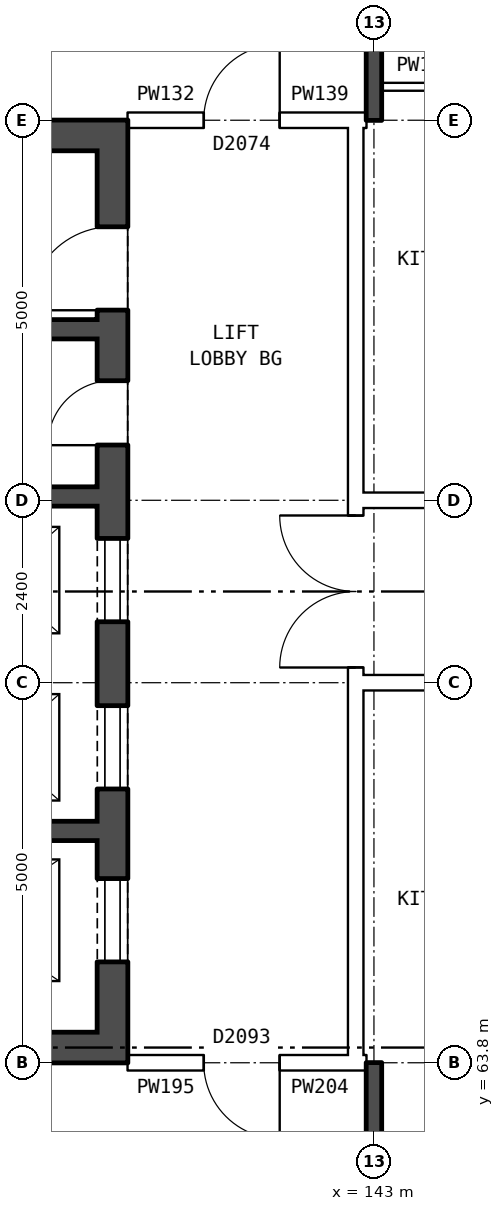
"""IFC4 building model, lengths in metres.
Left out: names, types, materials, properties, quantities, classifications, styles, units other than length and angle.
Written with IfcOpenShell. Run it as: python <this file> out.ifc"""

import sys

from ifc_helpers import new_model, si_unit, direction, frame, frame_2d, origin, place, context, subcontext, project, spatial, rectangle, extrude, element, fill, save


model = new_model("IFC4")
c1 = context("Model", 3, precision=1e-05, world=origin(), true_north=direction((0.0, 1.0)))
c2 = subcontext(c1, "Body", "Model", "MODEL_VIEW")
j1 = project(units=[si_unit("LENGTHUNIT", "METRE"), si_unit("PLANEANGLEUNIT", "RADIAN")], contexts=[c1])
p1 = place(None, origin())
s1 = spatial("IfcSite", under=j1, at=p1, CompositionType="ELEMENT")
p2 = place(p1, origin())
s2 = spatial("IfcBuilding", under=s1, at=p2, CompositionType="ELEMENT")
p3 = place(p2, frame((0.0, 0.0, 202.8)))
s3 = spatial("IfcBuildingStorey", under=s2, at=p3, CompositionType="ELEMENT", Elevation=202.8)
p4 = place(p3, frame((139.56, 63.8, 0.0), z_axis=(0.0, 0.0, 1.0), x_axis=(0.0, 1.0, 0.0)))
e1 = element("IfcWall", 1, at=p4, inside=s3, PredefinedType="SHEAR", context=c2, shape_type="SweptSolid", body=[
    extrude(rectangle(XDim=12.4, YDim=0.4, at=frame_2d((6.2, 0.0))), origin(), (0.0, 0.0, 1.0), 2.85),
])
p5 = place(p4, frame((1.325, 0.0, 0.0)))
e2 = element("IfcOpeningElement", 2, at=p5, cuts=e1, PredefinedType="OPENING", context=c2, shape_type="SweptSolid", body=[
    extrude(rectangle(XDim=1.1, YDim=2.1, at=frame_2d((0.55, 1.05))), frame((0.0, 0.21, 0.0), z_axis=(0.0, -1.0, 0.0), x_axis=(1.0, 0.0, 0.0)), (0.0, 0.0, 1.0), 0.42),
])
p6 = place(p4, frame((3.6, 0.0, 0.0)))
e3 = element("IfcOpeningElement", 3, at=p6, cuts=e1, PredefinedType="OPENING", context=c2, shape_type="SweptSolid", body=[
    extrude(rectangle(XDim=1.1, YDim=2.1, at=frame_2d((0.55, 1.05))), frame((0.0, 0.21, 0.0), z_axis=(0.0, -1.0, 0.0), x_axis=(1.0, 0.0, 0.0)), (0.0, 0.0, 1.0), 0.42),
])
p7 = place(p4, frame((5.8, 0.0, 0.0)))
e4 = element("IfcOpeningElement", 4, at=p7, cuts=e1, PredefinedType="OPENING", context=c2, shape_type="SweptSolid", body=[
    extrude(rectangle(XDim=1.1, YDim=2.1, at=frame_2d((0.55, 1.05))), frame((0.0, 0.21, 0.0), z_axis=(0.0, -1.0, 0.0), x_axis=(1.0, 0.0, 0.0)), (0.0, 0.0, 1.0), 0.42),
])
p8 = place(p4, frame((9.9, 0.0, 0.0)))
e5 = element("IfcOpeningElement", 5, at=p8, cuts=e1, PredefinedType="OPENING", context=c2, shape_type="SweptSolid", body=[
    extrude(rectangle(XDim=1.1, YDim=2.1, at=frame_2d((0.55, 1.05))), frame((0.0, 0.21, 0.0), z_axis=(0.0, -1.0, 0.0), x_axis=(1.0, 0.0, 0.0)), (0.0, 0.0, 1.0), 0.42),
])
p9 = place(p4, frame((8.125, 0.0, 0.0)))
e6 = element("IfcOpeningElement", 6, at=p9, cuts=e1, PredefinedType="OPENING", context=c2, shape_type="SweptSolid", body=[
    extrude(rectangle(XDim=0.85, YDim=2.1, at=frame_2d((0.425, 1.05))), frame((0.0, 0.21, 0.0), z_axis=(0.0, -1.0, 0.0), x_axis=(1.0, 0.0, 0.0)), (0.0, 0.0, 1.0), 0.42),
])
for number, where, z_axis, x_axis in (
    (7, (139.36, 64.0, 0.0), (0.0, 0.0, 1.0), (-1.0, 0.0, 0.0)),
    (8, (139.36, 76.0, 0.0), (0.0, 0.0, 1.0), (-1.0, 0.0, 0.0)),
):
    element("IfcWall", number, at=place(p3, frame(where, z_axis=z_axis, x_axis=x_axis)), inside=s3, PredefinedType="SHEAR", context=c2, shape_type="SweptSolid", body=[
        extrude(rectangle(XDim=7.6, YDim=0.4, at=frame_2d((3.8, 0.0))), origin(), (0.0, 0.0, 1.0), 2.85),
    ])
p10 = place(p3, frame((139.36, 66.85, 0.0), z_axis=(0.0, 0.0, 1.0), x_axis=(-1.0, 0.0, 0.0)))
e9 = element("IfcWall", 9, at=p10, inside=s3, PredefinedType="SHEAR", context=c2, shape_type="SweptSolid", body=[
    extrude(rectangle(XDim=4.775, YDim=0.25, at=frame_2d((2.388, 0.0))), origin(), (0.0, 0.0, 1.0), 2.85),
])
p11 = place(p3, frame((139.36, 71.25, 0.0), z_axis=(0.0, 0.0, 1.0), x_axis=(-1.0, 0.0, 0.0)))
e10 = element("IfcWall", 10, at=p11, inside=s3, PredefinedType="SHEAR", context=c2, shape_type="SweptSolid", body=[
    extrude(rectangle(XDim=7.6, YDim=0.25, at=frame_2d((3.8, 0.0))), origin(), (0.0, 0.0, 1.0), 2.85),
])
p12 = place(p11, frame((5.175, 0.0, 0.0)))
e11 = element("IfcOpeningElement", 11, at=p12, cuts=e10, PredefinedType="OPENING", context=c2, shape_type="SweptSolid", body=[
    extrude(rectangle(XDim=1.1, YDim=2.1, at=frame_2d((0.55, 1.05))), frame((0.0, 0.135, 0.0), z_axis=(0.0, -1.0, 0.0), x_axis=(1.0, 0.0, 0.0)), (0.0, 0.0, 1.0), 0.27),
])
p13 = place(p11, frame((3.35, 0.0, 0.0)))
e12 = element("IfcOpeningElement", 12, at=p13, cuts=e10, PredefinedType="OPENING", context=c2, shape_type="SweptSolid", body=[
    extrude(rectangle(XDim=0.85, YDim=2.1, at=frame_2d((0.425, 1.05))), frame((0.0, 0.135, 0.0), z_axis=(0.0, -1.0, 0.0), x_axis=(1.0, 0.0, 0.0)), (0.0, 0.0, 1.0), 0.27),
])
p14 = place(p3, frame((139.36, 73.45, 0.0), z_axis=(0.0, 0.0, 1.0), x_axis=(-1.0, 0.0, 0.0)))
e13 = element("IfcWall", 13, at=p14, inside=s3, PredefinedType="SHEAR", context=c2, shape_type="SweptSolid", body=[
    extrude(rectangle(XDim=2.525, YDim=0.25, at=frame_2d((1.263, 0.0))), origin(), (0.0, 0.0, 1.0), 2.85),
])
p15 = place(p3, frame((142.76, 63.9, 0.0), z_axis=(0.0, 0.0, 1.0), x_axis=(0.0, 1.0, 0.0)))
e14 = element("IfcWall", 14, at=p15, inside=s3, PredefinedType="PARTITIONING", context=c2, shape_type="SweptSolid", body=[
    extrude(rectangle(XDim=12.2, YDim=0.2, at=frame_2d((6.1, 0.0))), origin(), (0.0, 0.0, 1.0), 2.85),
])
p16 = place(p15, frame((5.1, 0.0, 0.0)))
e15 = element("IfcOpeningElement", 15, at=p16, cuts=e14, PredefinedType="OPENING", context=c2, shape_type="SweptSolid", body=[
    extrude(rectangle(XDim=2.0, YDim=2.1, at=frame_2d((1.0, 1.05))), frame((0.0, 0.11, 0.0), z_axis=(0.0, -1.0, 0.0), x_axis=(1.0, 0.0, 0.0)), (0.0, 0.0, 1.0), 0.22),
])
p17 = place(p3, frame((139.76, 63.8, 0.0), z_axis=(0.0, 0.0, 1.0), x_axis=(1.0, 0.0, 0.0)))
e16 = element("IfcWall", 16, at=p17, inside=s3, PredefinedType="PARTITIONING", context=c2, shape_type="SweptSolid", body=[
    extrude(rectangle(XDim=3.0, YDim=0.2, at=frame_2d((1.5, 0.0))), origin(), (0.0, 0.0, 1.0), 2.85),
])
p18 = place(p17, frame((1.0, 0.0, 0.0)))
e17 = element("IfcOpeningElement", 17, at=p18, cuts=e16, PredefinedType="OPENING", context=c2, shape_type="SweptSolid", body=[
    extrude(rectangle(XDim=1.0, YDim=2.1, at=frame_2d((0.5, 1.05))), frame((0.0, 0.11, 0.0), z_axis=(0.0, -1.0, 0.0), x_axis=(1.0, 0.0, 0.0)), (0.0, 0.0, 1.0), 0.22),
])
p19 = place(p3, frame((142.76, 63.8, 0.0), z_axis=(0.0, 0.0, 1.0), x_axis=(1.0, 0.0, 0.0)))
e18 = element("IfcWall", 18, at=p19, inside=s3, PredefinedType="PARTITIONING", context=c2, shape_type="SweptSolid", body=[
    extrude(rectangle(XDim=0.14, YDim=0.2, at=frame_2d((0.07, 0.0))), origin(), (0.0, 0.0, 1.0), 2.85),
])
p20 = place(p3, frame((142.76, 68.8, 0.0), z_axis=(0.0, 0.0, 1.0), x_axis=(1.0, 0.0, 0.0)))
e19 = element("IfcWall", 19, at=p20, inside=s3, PredefinedType="PARTITIONING", context=c2, shape_type="SweptSolid", body=[
    extrude(rectangle(XDim=14.48, YDim=0.2, at=frame_2d((7.24, 0.0))), origin(), (0.0, 0.0, 1.0), 2.85),
])
p21 = place(p20, frame((1.12, 0.0, 0.0)))
e20 = element("IfcOpeningElement", 20, at=p21, cuts=e19, PredefinedType="OPENING", context=c2, shape_type="SweptSolid", body=[
    extrude(rectangle(XDim=1.0, YDim=2.1, at=frame_2d((0.5, 1.05))), frame((0.0, 0.11, 0.0), z_axis=(0.0, -1.0, 0.0), x_axis=(1.0, 0.0, 0.0)), (0.0, 0.0, 1.0), 0.22),
])
p22 = place(p20, frame((10.24, 0.0, 0.0)))
e21 = element("IfcOpeningElement", 21, at=p22, cuts=e19, PredefinedType="OPENING", context=c2, shape_type="SweptSolid", body=[
    extrude(rectangle(XDim=1.0, YDim=2.1, at=frame_2d((0.5, 1.05))), frame((0.0, 0.11, 0.0), z_axis=(0.0, -1.0, 0.0), x_axis=(1.0, 0.0, 0.0)), (0.0, 0.0, 1.0), 0.22),
])
p23 = place(p3, frame((142.76, 71.2, 0.0), z_axis=(0.0, 0.0, 1.0), x_axis=(1.0, 0.0, 0.0)))
e22 = element("IfcWall", 22, at=p23, inside=s3, PredefinedType="PARTITIONING", context=c2, shape_type="SweptSolid", body=[
    extrude(rectangle(XDim=14.48, YDim=0.2, at=frame_2d((7.24, 0.0))), origin(), (0.0, 0.0, 1.0), 2.85),
])
p24 = place(p23, frame((1.12, 0.0, 0.0)))
e23 = element("IfcOpeningElement", 23, at=p24, cuts=e22, PredefinedType="OPENING", context=c2, shape_type="SweptSolid", body=[
    extrude(rectangle(XDim=1.0, YDim=2.1, at=frame_2d((0.5, 1.05))), frame((0.0, 0.11, 0.0), z_axis=(0.0, -1.0, 0.0), x_axis=(1.0, 0.0, 0.0)), (0.0, 0.0, 1.0), 0.22),
])
p25 = place(p23, frame((7.24, 0.0, 0.0)))
e24 = element("IfcOpeningElement", 24, at=p25, cuts=e22, PredefinedType="OPENING", context=c2, shape_type="SweptSolid", body=[
    extrude(rectangle(XDim=1.0, YDim=2.1, at=frame_2d((0.5, 1.05))), frame((0.0, 0.11, 0.0), z_axis=(0.0, -1.0, 0.0), x_axis=(1.0, 0.0, 0.0)), (0.0, 0.0, 1.0), 0.22),
])
p26 = place(p3, frame((139.76, 76.2, 0.0), z_axis=(0.0, 0.0, 1.0), x_axis=(1.0, 0.0, 0.0)))
e25 = element("IfcWall", 25, at=p26, inside=s3, PredefinedType="PARTITIONING", context=c2, shape_type="SweptSolid", body=[
    extrude(rectangle(XDim=3.0, YDim=0.2, at=frame_2d((1.5, 0.0))), origin(), (0.0, 0.0, 1.0), 2.85),
])
p27 = place(p26, frame((1.0, 0.0, 0.0)))
e26 = element("IfcOpeningElement", 26, at=p27, cuts=e25, PredefinedType="OPENING", context=c2, shape_type="SweptSolid", body=[
    extrude(rectangle(XDim=1.0, YDim=2.1, at=frame_2d((0.5, 1.05))), frame((0.0, 0.11, 0.0), z_axis=(0.0, -1.0, 0.0), x_axis=(1.0, 0.0, 0.0)), (0.0, 0.0, 1.0), 0.22),
])
p28 = place(p3, frame((142.76, 76.2, 0.0), z_axis=(0.0, 0.0, 1.0), x_axis=(1.0, 0.0, 0.0)))
e27 = element("IfcWall", 27, at=p28, inside=s3, PredefinedType="PARTITIONING", context=c2, shape_type="SweptSolid", body=[
    extrude(rectangle(XDim=0.14, YDim=0.2, at=frame_2d((0.07, 0.0))), origin(), (0.0, 0.0, 1.0), 2.85),
])
p29 = place(p3, frame((143.1, 76.64, 0.0), z_axis=(0.0, 0.0, 1.0), x_axis=(1.0, 0.0, 0.0)))
e28 = element("IfcWall", 28, at=p29, inside=s3, PredefinedType="PARTITIONING", context=c2, shape_type="SweptSolid", body=[
    extrude(rectangle(XDim=2.9, YDim=0.1, at=frame_2d((1.45, 0.0))), origin(), (0.0, 0.0, 1.0), 2.85),
])
p30 = place(p29, frame((1.0, 0.0, 0.0)))
e29 = element("IfcOpeningElement", 29, at=p30, cuts=e28, PredefinedType="OPENING", context=c2, shape_type="SweptSolid", body=[
    extrude(rectangle(XDim=0.9, YDim=2.1, at=frame_2d((0.45, 1.05))), frame((0.0, 0.06, 0.0), z_axis=(0.0, -1.0, 0.0), x_axis=(1.0, 0.0, 0.0)), (0.0, 0.0, 1.0), 0.12),
])
for number, where, z_axis, x_axis in (
    (30, (143.0, 54.36, 0.0), (0.0, 0.0, 1.0), (0.0, 1.0, 0.0)),
    (31, (143.0, 76.2, 0.0), (0.0, 0.0, 1.0), (0.0, 1.0, 0.0)),
):
    element("IfcWall", number, at=place(p3, frame(where, z_axis=z_axis, x_axis=x_axis)), inside=s3, PredefinedType="SOLIDWALL", context=c2, shape_type="SweptSolid", body=[
        extrude(rectangle(XDim=9.44, YDim=0.2, at=frame_2d((4.72, 0.0))), origin(), (0.0, 0.0, 1.0), 2.85),
    ])
p31 = place(p5, origin())
e32 = element("IfcDoor", 32, at=p31, inside=s3, OperationType="DOUBLE_DOOR_SLIDING", PredefinedType="DOOR", context=c2, shape_type="SweptSolid", body=[
    extrude(rectangle(XDim=1.1, YDim=2.1, at=frame_2d((0.55, 1.05))), frame((0.0, 0.185, 0.0), z_axis=(0.0, -1.0, 0.0), x_axis=(1.0, 0.0, 0.0)), (0.0, 0.0, 1.0), 0.05),
])
fill(e2, e32)
p32 = place(p6, origin())
e33 = element("IfcDoor", 33, at=p32, inside=s3, OperationType="DOUBLE_DOOR_SLIDING", PredefinedType="DOOR", context=c2, shape_type="SweptSolid", body=[
    extrude(rectangle(XDim=1.1, YDim=2.1, at=frame_2d((0.55, 1.05))), frame((0.0, 0.185, 0.0), z_axis=(0.0, -1.0, 0.0), x_axis=(1.0, 0.0, 0.0)), (0.0, 0.0, 1.0), 0.05),
])
fill(e3, e33)
p33 = place(p7, origin())
e34 = element("IfcDoor", 34, at=p33, inside=s3, OperationType="DOUBLE_DOOR_SLIDING", PredefinedType="DOOR", context=c2, shape_type="SweptSolid", body=[
    extrude(rectangle(XDim=1.1, YDim=2.1, at=frame_2d((0.55, 1.05))), frame((0.0, 0.185, 0.0), z_axis=(0.0, -1.0, 0.0), x_axis=(1.0, 0.0, 0.0)), (0.0, 0.0, 1.0), 0.05),
])
fill(e4, e34)
p34 = place(p8, origin())
e35 = element("IfcDoor", 35, at=p34, inside=s3, OperationType="SINGLE_SWING_LEFT", PredefinedType="DOOR", context=c2, shape_type="SweptSolid", body=[
    extrude(rectangle(XDim=1.1, YDim=2.1, at=frame_2d((0.55, 1.05))), frame((0.0, 0.185, 0.0), z_axis=(0.0, -1.0, 0.0), x_axis=(1.0, 0.0, 0.0)), (0.0, 0.0, 1.0), 0.05),
])
fill(e5, e35)
p35 = place(p9, origin())
e36 = element("IfcDoor", 36, at=p35, inside=s3, OperationType="SINGLE_SWING_LEFT", PredefinedType="DOOR", context=c2, shape_type="SweptSolid", body=[
    extrude(rectangle(XDim=0.85, YDim=2.1, at=frame_2d((0.425, 1.05))), frame((0.0, 0.185, 0.0), z_axis=(0.0, -1.0, 0.0), x_axis=(1.0, 0.0, 0.0)), (0.0, 0.0, 1.0), 0.05),
])
fill(e6, e36)
p36 = place(p16, origin())
e37 = element("IfcDoor", 37, at=p36, inside=s3, OperationType="DOUBLE_DOOR_SINGLE_SWING", PredefinedType="DOOR", context=c2, shape_type="SweptSolid", body=[
    extrude(rectangle(XDim=2.0, YDim=2.1, at=frame_2d((1.0, 1.05))), frame((0.0, 0.025, 0.0), z_axis=(0.0, -1.0, 0.0), x_axis=(1.0, 0.0, 0.0)), (0.0, 0.0, 1.0), 0.05),
])
fill(e15, e37)
p37 = place(p18, frame((1.0, 0.0, 0.0), z_axis=(0.0, 0.0, 1.0), x_axis=(-1.0, 0.0, 0.0)))
e38 = element("IfcDoor", 38, at=p37, inside=s3, OperationType="SINGLE_SWING_LEFT", PredefinedType="DOOR", context=c2, shape_type="SweptSolid", body=[
    extrude(rectangle(XDim=1.0, YDim=2.1, at=frame_2d((0.5, 1.05))), frame((0.0, 0.025, 0.0), z_axis=(0.0, -1.0, 0.0), x_axis=(1.0, 0.0, 0.0)), (0.0, 0.0, 1.0), 0.05),
])
fill(e17, e38)
p38 = place(p27, origin())
e39 = element("IfcDoor", 39, at=p38, inside=s3, OperationType="SINGLE_SWING_RIGHT", PredefinedType="DOOR", context=c2, shape_type="SweptSolid", body=[
    extrude(rectangle(XDim=1.0, YDim=2.1, at=frame_2d((0.5, 1.05))), frame((0.0, 0.025, 0.0), z_axis=(0.0, -1.0, 0.0), x_axis=(1.0, 0.0, 0.0)), (0.0, 0.0, 1.0), 0.05),
])
fill(e26, e39)
save(model, sys.argv[1])
